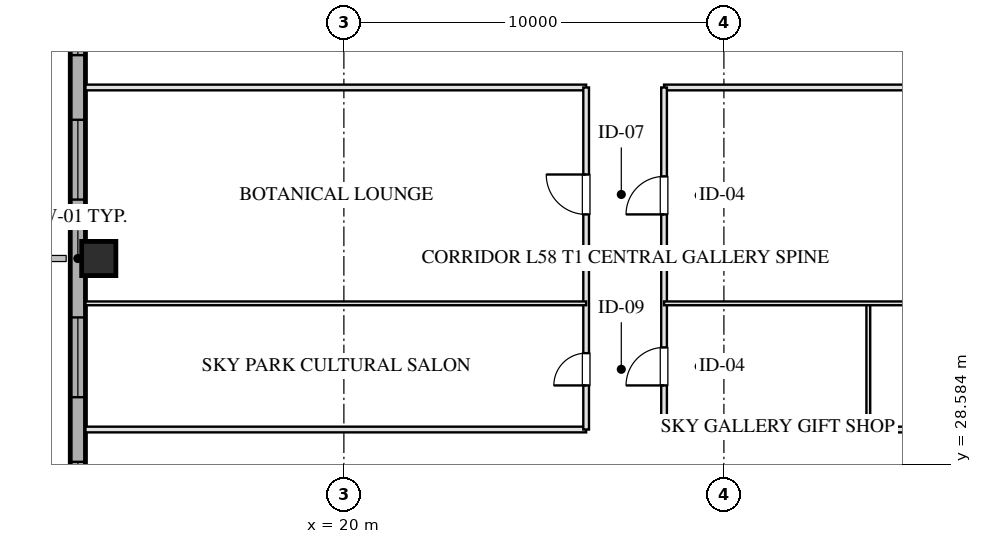
"""IFC4 building model, lengths in metres.
Left out: names, types, materials, properties, quantities, classifications, styles, units other than length and angle.
Written with IfcOpenShell. Run it as: python <this file> out.ifc"""

import sys

from ifc_helpers import new_model, si_unit, direction, frame, frame_2d, origin, origin_2d, place, context, subcontext, project, spatial, rectangle, hollow_rectangle, extrude, element, fill, save


model = new_model("IFC4")
c1 = context("Model", 3, precision=1e-05, world=origin(), true_north=direction((0.0, 1.0)))
c2 = subcontext(c1, "Body", "Model", "MODEL_VIEW")
j1 = project(units=[si_unit("LENGTHUNIT", "METRE"), si_unit("PLANEANGLEUNIT", "RADIAN")], contexts=[c1])
p1 = place(None, origin())
s1 = spatial("IfcSite", under=j1, at=p1, CompositionType="ELEMENT")
p2 = place(p1, origin())
s2 = spatial("IfcBuilding", under=s1, at=p2, CompositionType="ELEMENT")
p3 = place(p2, frame((0.0, 0.0, 216.2)))
s3 = spatial("IfcBuildingStorey", under=s2, at=p3, CompositionType="ELEMENT", Elevation=216.2)
p4 = place(p3, frame((13.55, 34.0, 0.0), z_axis=(0.0, 0.0, 1.0), x_axis=(1.0, 0.0, 0.0)))
e1 = element("IfcColumn", 1, at=p4, inside=s3, PredefinedType="COLUMN", context=c2, shape_type="SweptSolid", body=[
    extrude(hollow_rectangle(XDim=0.9, YDim=0.9, WallThickness=0.032, at=origin_2d()), origin(), (0.0, 0.0, 1.0), 3.451),
])
p5 = place(p3, frame((13.0, 10.8, 0.0), z_axis=(0.0, 0.0, 1.0), x_axis=(0.0, 1.0, 0.0)))
e2 = element("IfcWall", 2, at=p5, inside=s3, PredefinedType="SOLIDWALL", context=c2, shape_type="SweptSolid", body=[
    extrude(rectangle(XDim=46.4, YDim=0.4, at=frame_2d((23.2, 0.0))), origin(), (0.0, 0.0, 1.0), 2.55),
])
p6 = place(p5, frame((15.75, 0.0, 0.75)))
e3 = element("IfcOpeningElement", 3, at=p6, cuts=e2, PredefinedType="OPENING", context=c2, shape_type="SweptSolid", body=[
    extrude(rectangle(XDim=2.1, YDim=1.4, at=frame_2d((1.05, 0.7))), frame((0.0, 0.21, 0.0), z_axis=(0.0, -1.0, 0.0), x_axis=(1.0, 0.0, 0.0)), (0.0, 0.0, 1.0), 0.42),
])
p7 = place(p5, frame((19.55, 0.0, 0.75)))
e4 = element("IfcOpeningElement", 4, at=p7, cuts=e2, PredefinedType="OPENING", context=c2, shape_type="SweptSolid", body=[
    extrude(rectangle(XDim=2.1, YDim=1.4, at=frame_2d((1.05, 0.7))), frame((0.0, 0.21, 0.0), z_axis=(0.0, -1.0, 0.0), x_axis=(1.0, 0.0, 0.0)), (0.0, 0.0, 1.0), 0.42),
])
p8 = place(p5, frame((24.75, 0.0, 0.75)))
e5 = element("IfcOpeningElement", 5, at=p8, cuts=e2, PredefinedType="OPENING", context=c2, shape_type="SweptSolid", body=[
    extrude(rectangle(XDim=2.1, YDim=1.4, at=frame_2d((1.05, 0.7))), frame((0.0, 0.21, 0.0), z_axis=(0.0, -1.0, 0.0), x_axis=(1.0, 0.0, 0.0)), (0.0, 0.0, 1.0), 0.42),
])
p9 = place(p5, frame((28.55, 0.0, 0.75)))
e6 = element("IfcOpeningElement", 6, at=p9, cuts=e2, PredefinedType="OPENING", context=c2, shape_type="SweptSolid", body=[
    extrude(rectangle(XDim=2.1, YDim=1.4, at=frame_2d((1.05, 0.7))), frame((0.0, 0.21, 0.0), z_axis=(0.0, -1.0, 0.0), x_axis=(1.0, 0.0, 0.0)), (0.0, 0.0, 1.0), 0.42),
])
p10 = place(p3, frame((13.2, 29.5, 0.0), z_axis=(0.0, 0.0, 1.0), x_axis=(1.0, 0.0, 0.0)))
e7 = element("IfcWall", 7, at=p10, inside=s3, PredefinedType="PARTITIONING", context=c2, shape_type="SweptSolid", body=[
    extrude(rectangle(XDim=13.175, YDim=0.15, at=frame_2d((6.587, 0.0))), origin(), (0.0, 0.0, 1.0), 3.155),
])
p11 = place(p3, frame((28.425, 29.5, 0.0), z_axis=(0.0, 0.0, 1.0), x_axis=(1.0, 0.0, 0.0)))
e8 = element("IfcWall", 8, at=p11, inside=s3, PredefinedType="PARTITIONING", context=c2, shape_type="SweptSolid", body=[
    extrude(rectangle(XDim=18.375, YDim=0.15, at=frame_2d((9.188, 0.0))), origin(), (0.0, 0.0, 1.0), 3.155),
])
p12 = place(p11, frame((10.725, 0.0, 0.0)))
e9 = element("IfcOpeningElement", 9, at=p12, cuts=e8, PredefinedType="OPENING", context=c2, shape_type="SweptSolid", body=[
    extrude(rectangle(XDim=1.0, YDim=2.05, at=frame_2d((0.5, 1.025))), frame((0.0, 0.085, 0.0), z_axis=(0.0, -1.0, 0.0), x_axis=(1.0, 0.0, 0.0)), (0.0, 0.0, 1.0), 0.17),
])
p13 = place(p3, frame((13.2, 38.5, 0.0), z_axis=(0.0, 0.0, 1.0), x_axis=(1.0, 0.0, 0.0)))
e10 = element("IfcWall", 10, at=p13, inside=s3, PredefinedType="PARTITIONING", context=c2, shape_type="SweptSolid", body=[
    extrude(rectangle(XDim=13.175, YDim=0.15, at=frame_2d((6.587, 0.0))), origin(), (0.0, 0.0, 1.0), 3.155),
])
p14 = place(p3, frame((28.425, 38.5, 0.0), z_axis=(0.0, 0.0, 1.0), x_axis=(1.0, 0.0, 0.0)))
e11 = element("IfcWall", 11, at=p14, inside=s3, PredefinedType="PARTITIONING", context=c2, shape_type="SweptSolid", body=[
    extrude(rectangle(XDim=18.375, YDim=0.15, at=frame_2d((9.188, 0.0))), origin(), (0.0, 0.0, 1.0), 3.155),
])
p15 = place(p3, frame((26.375, 29.5, 0.0), z_axis=(0.0, 0.0, 1.0), x_axis=(0.0, 1.0, 0.0)))
e12 = element("IfcWall", 12, at=p15, inside=s3, PredefinedType="PARTITIONING", context=c2, shape_type="SweptSolid", body=[
    extrude(rectangle(XDim=9.0, YDim=0.15, at=frame_2d((4.5, 0.0))), origin(), (0.0, 0.0, 1.0), 3.155),
])
p16 = place(p15, frame((1.16, 0.0, 0.0)))
e13 = element("IfcOpeningElement", 13, at=p16, cuts=e12, PredefinedType="OPENING", context=c2, shape_type="SweptSolid", body=[
    extrude(rectangle(XDim=0.85, YDim=2.05, at=frame_2d((0.425, 1.025))), frame((0.0, 0.085, 0.0), z_axis=(0.0, -1.0, 0.0), x_axis=(1.0, 0.0, 0.0)), (0.0, 0.0, 1.0), 0.17),
])
p17 = place(p15, frame((5.66, 0.0, 0.0)))
e14 = element("IfcOpeningElement", 14, at=p17, cuts=e12, PredefinedType="OPENING", context=c2, shape_type="SweptSolid", body=[
    extrude(rectangle(XDim=1.05, YDim=2.05, at=frame_2d((0.525, 1.025))), frame((0.0, 0.085, 0.0), z_axis=(0.0, -1.0, 0.0), x_axis=(1.0, 0.0, 0.0)), (0.0, 0.0, 1.0), 0.17),
])
p18 = place(p3, frame((28.425, 29.5, 0.0), z_axis=(0.0, 0.0, 1.0), x_axis=(0.0, 1.0, 0.0)))
e15 = element("IfcWall", 15, at=p18, inside=s3, PredefinedType="PARTITIONING", context=c2, shape_type="SweptSolid", body=[
    extrude(rectangle(XDim=9.0, YDim=0.15, at=frame_2d((4.5, 0.0))), origin(), (0.0, 0.0, 1.0), 3.155),
])
p19 = place(p18, frame((1.16, 0.0, 0.0)))
e16 = element("IfcOpeningElement", 16, at=p19, cuts=e15, PredefinedType="OPENING", context=c2, shape_type="SweptSolid", body=[
    extrude(rectangle(XDim=1.0, YDim=2.05, at=frame_2d((0.5, 1.025))), frame((0.0, 0.085, 0.0), z_axis=(0.0, -1.0, 0.0), x_axis=(1.0, 0.0, 0.0)), (0.0, 0.0, 1.0), 0.17),
])
p20 = place(p18, frame((5.66, 0.0, 0.0)))
e17 = element("IfcOpeningElement", 17, at=p20, cuts=e15, PredefinedType="OPENING", context=c2, shape_type="SweptSolid", body=[
    extrude(rectangle(XDim=1.0, YDim=2.05, at=frame_2d((0.5, 1.025))), frame((0.0, 0.085, 0.0), z_axis=(0.0, -1.0, 0.0), x_axis=(1.0, 0.0, 0.0)), (0.0, 0.0, 1.0), 0.17),
])
p21 = place(p3, frame((13.2, 32.82, 0.0), z_axis=(0.0, 0.0, 1.0), x_axis=(1.0, 0.0, 0.0)))
e18 = element("IfcWall", 18, at=p21, inside=s3, PredefinedType="MOVABLE", context=c2, shape_type="SweptSolid", body=[
    extrude(rectangle(XDim=13.175, YDim=0.1, at=frame_2d((6.587, 0.0))), origin(), (0.0, 0.0, 1.0), 3.155),
])
p22 = place(p3, frame((33.8, 29.5, 0.0), z_axis=(0.0, 0.0, 1.0), x_axis=(0.0, 1.0, 0.0)))
e19 = element("IfcWall", 19, at=p22, inside=s3, PredefinedType="MOVABLE", context=c2, shape_type="SweptSolid", body=[
    extrude(rectangle(XDim=3.32, YDim=0.1, at=frame_2d((1.66, 0.0))), origin(), (0.0, 0.0, 1.0), 3.155),
])
p23 = place(p3, frame((28.425, 32.82, 0.0), z_axis=(0.0, 0.0, 1.0), x_axis=(1.0, 0.0, 0.0)))
e20 = element("IfcWall", 20, at=p23, inside=s3, PredefinedType="MOVABLE", context=c2, shape_type="SweptSolid", body=[
    extrude(rectangle(XDim=18.375, YDim=0.1, at=frame_2d((9.188, 0.0))), origin(), (0.0, 0.0, 1.0), 3.155),
])
p24 = place(p6, origin())
e21 = element("IfcWindow", 21, at=p24, inside=s3, PartitioningType="TRIPLE_PANEL_VERTICAL", PredefinedType="WINDOW", context=c2, shape_type="SweptSolid", body=[
    extrude(rectangle(XDim=2.1, YDim=1.4, at=frame_2d((1.05, 0.7))), frame((0.0, 0.03, 0.0), z_axis=(0.0, -1.0, 0.0), x_axis=(1.0, 0.0, 0.0)), (0.0, 0.0, 1.0), 0.06),
])
fill(e3, e21)
p25 = place(p7, origin())
e22 = element("IfcWindow", 22, at=p25, inside=s3, PartitioningType="TRIPLE_PANEL_VERTICAL", PredefinedType="WINDOW", context=c2, shape_type="SweptSolid", body=[
    extrude(rectangle(XDim=2.1, YDim=1.4, at=frame_2d((1.05, 0.7))), frame((0.0, 0.03, 0.0), z_axis=(0.0, -1.0, 0.0), x_axis=(1.0, 0.0, 0.0)), (0.0, 0.0, 1.0), 0.06),
])
fill(e4, e22)
p26 = place(p8, origin())
e23 = element("IfcWindow", 23, at=p26, inside=s3, PartitioningType="TRIPLE_PANEL_VERTICAL", PredefinedType="WINDOW", context=c2, shape_type="SweptSolid", body=[
    extrude(rectangle(XDim=2.1, YDim=1.4, at=frame_2d((1.05, 0.7))), frame((0.0, 0.03, 0.0), z_axis=(0.0, -1.0, 0.0), x_axis=(1.0, 0.0, 0.0)), (0.0, 0.0, 1.0), 0.06),
])
fill(e5, e23)
p27 = place(p9, origin())
e24 = element("IfcWindow", 24, at=p27, inside=s3, PartitioningType="TRIPLE_PANEL_VERTICAL", PredefinedType="WINDOW", context=c2, shape_type="SweptSolid", body=[
    extrude(rectangle(XDim=2.1, YDim=1.4, at=frame_2d((1.05, 0.7))), frame((0.0, 0.03, 0.0), z_axis=(0.0, -1.0, 0.0), x_axis=(1.0, 0.0, 0.0)), (0.0, 0.0, 1.0), 0.06),
])
fill(e6, e24)
p28 = place(p16, origin())
e25 = element("IfcDoor", 25, at=p28, inside=s3, OperationType="SINGLE_SWING_LEFT", PredefinedType="DOOR", context=c2, shape_type="SweptSolid", body=[
    extrude(rectangle(XDim=0.85, YDim=2.05, at=frame_2d((0.425, 1.025))), frame((0.0, 0.025, 0.0), z_axis=(0.0, -1.0, 0.0), x_axis=(1.0, 0.0, 0.0)), (0.0, 0.0, 1.0), 0.05),
])
fill(e13, e25)
p29 = place(p17, origin())
e26 = element("IfcDoor", 26, at=p29, inside=s3, OperationType="SINGLE_SWING_RIGHT", PredefinedType="DOOR", context=c2, shape_type="SweptSolid", body=[
    extrude(rectangle(XDim=1.05, YDim=2.05, at=frame_2d((0.525, 1.025))), frame((0.0, 0.025, 0.0), z_axis=(0.0, -1.0, 0.0), x_axis=(1.0, 0.0, 0.0)), (0.0, 0.0, 1.0), 0.05),
])
fill(e14, e26)
p30 = place(p19, origin())
e27 = element("IfcDoor", 27, at=p30, inside=s3, OperationType="SINGLE_SWING_LEFT", PredefinedType="DOOR", context=c2, shape_type="SweptSolid", body=[
    extrude(rectangle(XDim=1.0, YDim=2.05, at=frame_2d((0.5, 1.025))), frame((0.0, 0.025, 0.0), z_axis=(0.0, -1.0, 0.0), x_axis=(1.0, 0.0, 0.0)), (0.0, 0.0, 1.0), 0.05),
])
fill(e16, e27)
p31 = place(p20, origin())
e28 = element("IfcDoor", 28, at=p31, inside=s3, OperationType="SINGLE_SWING_LEFT", PredefinedType="DOOR", context=c2, shape_type="SweptSolid", body=[
    extrude(rectangle(XDim=1.0, YDim=2.05, at=frame_2d((0.5, 1.025))), frame((0.0, 0.025, 0.0), z_axis=(0.0, -1.0, 0.0), x_axis=(1.0, 0.0, 0.0)), (0.0, 0.0, 1.0), 0.05),
])
fill(e17, e28)
save(model, sys.argv[1])
